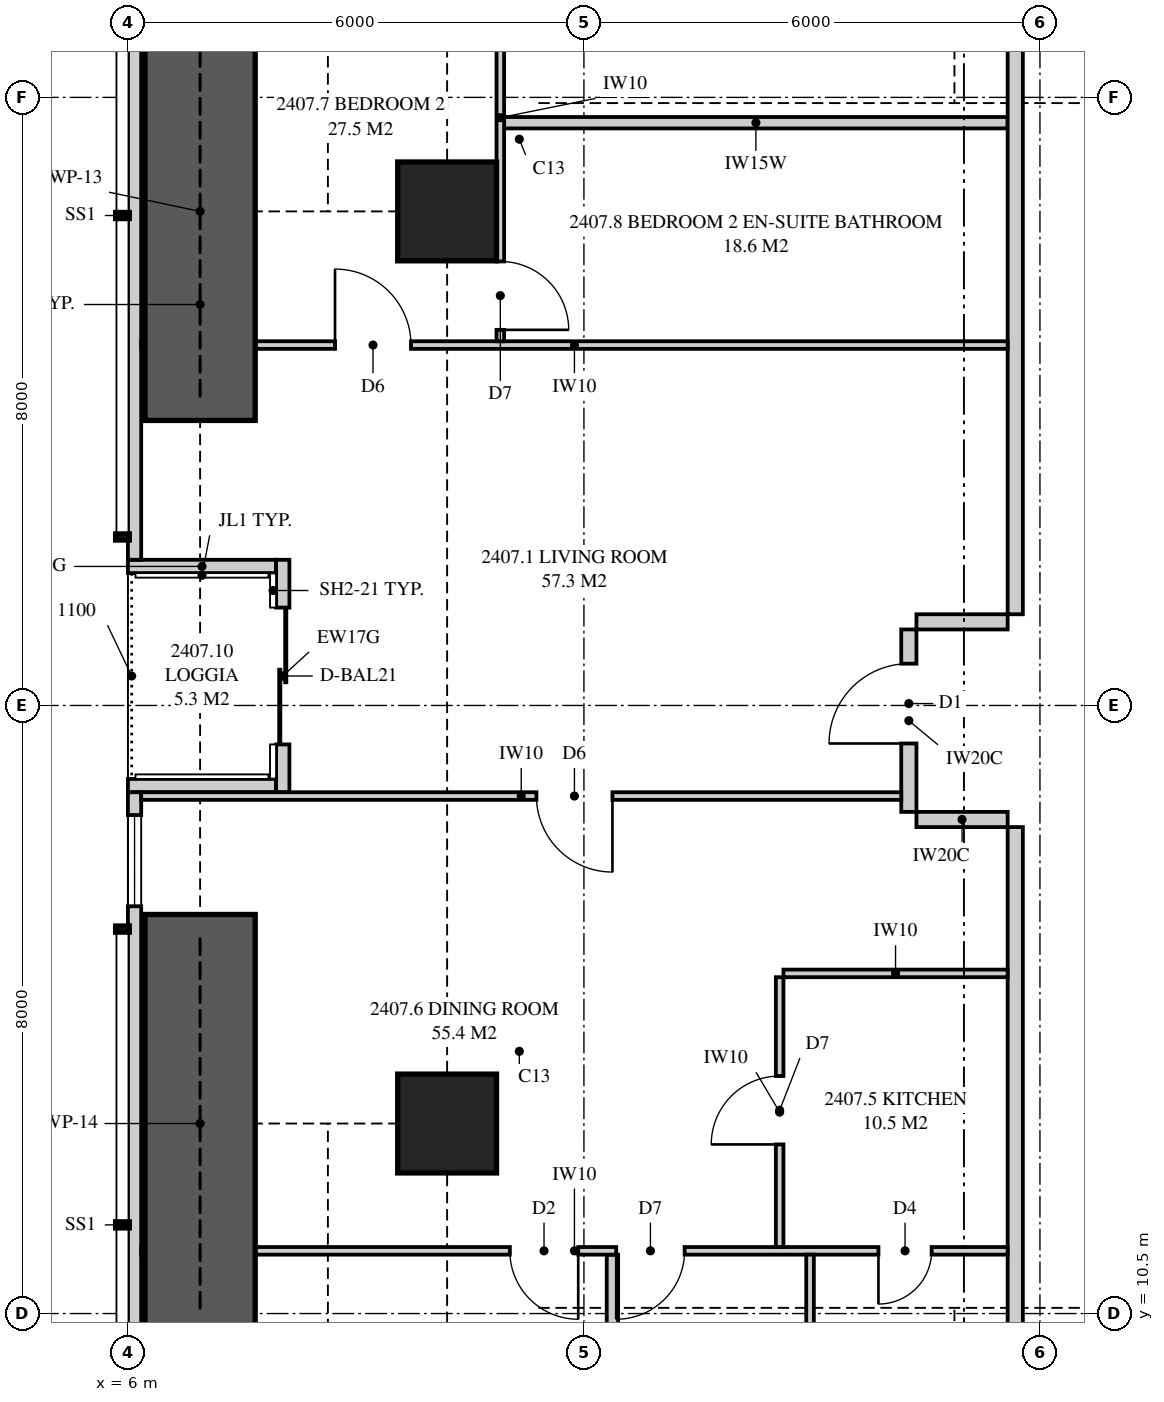
"""IFC4 building model, lengths in metres.
Left out: names, types, materials, properties, quantities, classifications, styles, units other than length and angle.
Written with IfcOpenShell. Run it as: python <this file> out.ifc"""

import sys

from ifc_helpers import new_model, si_unit, direction, frame, frame_2d, origin, origin_2d, place, context, subcontext, project, spatial, polyline, rectangle, outline, extrude, element, fill, save


model = new_model("IFC4")
c1 = context("Model", 3, precision=1e-05, world=origin(), true_north=direction((0.0, 1.0)))
c2 = subcontext(c1, "Body", "Model", "MODEL_VIEW")
j1 = project(units=[si_unit("LENGTHUNIT", "METRE"), si_unit("PLANEANGLEUNIT", "RADIAN")], contexts=[c1])
p1 = place(None, origin())
s1 = spatial("IfcSite", under=j1, at=p1, CompositionType="ELEMENT")
p2 = place(p1, origin())
s2 = spatial("IfcBuilding", under=s1, at=p2, CompositionType="ELEMENT")
p3 = place(p2, frame((0.0, 0.0, 91.45)))
s3 = spatial("IfcBuildingStorey", under=s2, at=p3, CompositionType="ELEMENT", Elevation=91.45)
for number, where, z_axis, x_axis in (
    (1, (10.2, 13.0, 0.0), (0.0, 0.0, 1.0), (1.0, 0.0, 0.0)),
    (2, (10.2, 25.0, 0.0), (0.0, 0.0, 1.0), (1.0, 0.0, 0.0)),
):
    element("IfcColumn", number, at=place(p3, frame(where, z_axis=z_axis, x_axis=x_axis)), inside=s3, PredefinedType="COLUMN", context=c2, shape_type="SweptSolid", body=[
        extrude(rectangle(XDim=1.3, YDim=1.3, at=origin_2d()), origin(), (0.0, 0.0, 1.0), 3.35),
    ])
p4 = place(p3, frame((6.087, 34.949, 0.0), z_axis=(0.0, 0.0, 1.0), x_axis=(0.0, -1.0, 0.0)))
e3 = element("IfcWall", 3, at=p4, inside=s3, PredefinedType="SOLIDWALL", context=c2, shape_type="SweptSolid", body=[
    extrude(outline(polyline([(0.0, 0.0), (14.532, 0.0), (14.532, 2.15), (9.949, 2.15), (9.949, 3.11), (9.823, 3.11), (9.823, 2.15), (9.73, 2.15), (9.73, 3.11), (0.0, 3.11), (0.0, 0.0)])), frame((0.0, 0.087, 0.0), z_axis=(0.0, -1.0, 0.0), x_axis=(1.0, 0.0, 0.0)), (0.0, 0.0, 1.0), 0.175),
])
p5 = place(p4, frame((2.724, 0.0, 0.4)))
e4 = element("IfcOpeningElement", 4, at=p5, cuts=e3, PredefinedType="OPENING", context=c2, shape_type="SweptSolid", body=[
    extrude(rectangle(XDim=1.8, YDim=1.7, at=frame_2d((0.9, 0.85))), frame((0.0, 0.097, 0.0), z_axis=(0.0, -1.0, 0.0), x_axis=(1.0, 0.0, 0.0)), (0.0, 0.0, 1.0), 0.195),
])
p6 = place(p4, frame((5.874, 0.0, 0.4)))
e5 = element("IfcOpeningElement", 5, at=p6, cuts=e3, PredefinedType="OPENING", context=c2, shape_type="SweptSolid", body=[
    extrude(rectangle(XDim=1.2, YDim=1.7, at=frame_2d((0.6, 0.85))), frame((0.0, 0.097, 0.0), z_axis=(0.0, -1.0, 0.0), x_axis=(1.0, 0.0, 0.0)), (0.0, 0.0, 1.0), 0.195),
])
p7 = place(p3, frame((6.087, 17.358, 0.0), z_axis=(0.0, 0.0, 1.0), x_axis=(0.0, -1.0, 0.0)))
e6 = element("IfcWall", 6, at=p7, inside=s3, PredefinedType="SOLIDWALL", context=c2, shape_type="SweptSolid", body=[
    extrude(outline(polyline([(0.0, 0.0), (14.307, 0.0), (14.307, 3.11), (4.577, 3.11), (4.577, 2.15), (4.484, 2.15), (4.484, 3.11), (4.358, 3.11), (4.358, 2.15), (0.0, 2.15), (0.0, 0.0)])), frame((0.0, 0.087, 0.0), z_axis=(0.0, -1.0, 0.0), x_axis=(1.0, 0.0, 0.0)), (0.0, 0.0, 1.0), 0.175),
])
p8 = place(p7, frame((0.3, 0.0, 0.4)))
e7 = element("IfcOpeningElement", 7, at=p8, cuts=e6, PredefinedType="OPENING", context=c2, shape_type="SweptSolid", body=[
    extrude(rectangle(XDim=1.2, YDim=1.7, at=frame_2d((0.6, 0.85))), frame((0.0, 0.097, 0.0), z_axis=(0.0, -1.0, 0.0), x_axis=(1.0, 0.0, 0.0)), (0.0, 0.0, 1.0), 0.195),
])
p9 = place(p7, frame((7.233, 0.0, 0.4)))
e8 = element("IfcOpeningElement", 8, at=p9, cuts=e6, PredefinedType="OPENING", context=c2, shape_type="SweptSolid", body=[
    extrude(rectangle(XDim=1.8, YDim=1.7, at=frame_2d((0.9, 0.85))), frame((0.0, 0.097, 0.0), z_axis=(0.0, -1.0, 0.0), x_axis=(1.0, 0.0, 0.0)), (0.0, 0.0, 1.0), 0.195),
])
p10 = place(p7, frame((10.283, 0.0, 0.4)))
e9 = element("IfcOpeningElement", 9, at=p10, cuts=e6, PredefinedType="OPENING", context=c2, shape_type="SweptSolid", body=[
    extrude(rectangle(XDim=1.8, YDim=1.7, at=frame_2d((0.9, 0.85))), frame((0.0, 0.097, 0.0), z_axis=(0.0, -1.0, 0.0), x_axis=(1.0, 0.0, 0.0)), (0.0, 0.0, 1.0), 0.195),
])
p11 = place(p3, frame((8.038, 20.417, 0.0), z_axis=(0.0, 0.0, 1.0), x_axis=(0.0, -1.0, 0.0)))
e10 = element("IfcWall", 10, at=p11, inside=s3, PredefinedType="SOLIDWALL", context=c2, shape_type="SweptSolid", body=[
    extrude(rectangle(XDim=3.058, YDim=0.175, at=frame_2d((1.529, 0.0))), origin(), (0.0, 0.0, 1.0), 3.11),
])
p12 = place(p11, frame((0.629, 0.0, 0.0)))
e11 = element("IfcOpeningElement", 11, at=p12, cuts=e10, PredefinedType="OPENING", context=c2, shape_type="SweptSolid", body=[
    extrude(rectangle(XDim=1.8, YDim=2.1, at=frame_2d((0.9, 1.05))), frame((0.0, 0.097, 0.0), z_axis=(0.0, -1.0, 0.0), x_axis=(1.0, 0.0, 0.0)), (0.0, 0.0, 1.0), 0.195),
])
for number, where, z_axis, x_axis in (
    (12, (6.0, 20.329, 0.0), (0.0, 0.0, 1.0), (1.0, 0.0, 0.0)),
    (13, (6.0, 17.446, 0.0), (0.0, 0.0, 1.0), (1.0, 0.0, 0.0)),
):
    element("IfcWall", number, at=place(p3, frame(where, z_axis=z_axis, x_axis=x_axis)), inside=s3, PredefinedType="SOLIDWALL", context=c2, shape_type="SweptSolid", body=[
        extrude(outline(polyline([(0.0, 0.0), (1.95, 0.0), (1.95, 3.11), (1.75, 3.11), (1.75, 2.15), (0.15, 2.15), (0.15, 3.11), (0.0, 3.11), (0.0, 0.0)])), frame((0.0, 0.087, 0.0), z_axis=(0.0, -1.0, 0.0), x_axis=(1.0, 0.0, 0.0)), (0.0, 0.0, 1.0), 0.175),
    ])
p13 = place(p3, frame((17.675, 7.825, 0.0), z_axis=(0.0, 0.0, 1.0), x_axis=(0.0, 1.0, 0.0)))
e14 = element("IfcWall", 14, at=p13, inside=s3, PredefinedType="PARTITIONING", context=c2, shape_type="SweptSolid", body=[
    extrude(outline(polyline([(0.0, 0.0), (9.075, 0.0), (9.075, 3.11), (3.087, 3.11), (3.087, 2.541), (2.413, 2.541), (2.413, 3.11), (0.0, 3.11), (0.0, 0.0)])), frame((0.0, 0.1, 0.0), z_axis=(0.0, -1.0, 0.0), x_axis=(1.0, 0.0, 0.0)), (0.0, 0.0, 1.0), 0.2),
])
p14 = place(p3, frame((6.175, 11.325, 0.0), z_axis=(0.0, 0.0, 1.0), x_axis=(1.0, 0.0, 0.0)))
e15 = element("IfcWall", 15, at=p14, inside=s3, PredefinedType="PARTITIONING", context=c2, shape_type="SweptSolid", body=[
    extrude(outline(polyline([(0.175, 3.11), (0.0, 3.11), (0.0, 0.0), (0.529, 0.0), (0.529, 0.325), (1.021, 0.325), (1.021, 0.0), (11.4, 0.0), (11.4, 3.11), (5.285, 3.11), (5.285, 2.51), (2.765, 2.51), (2.765, 3.11), (2.744, 3.11), (2.744, 2.541), (2.169, 2.541), (2.169, 3.11), (1.918, 3.11), (1.918, 2.15), (1.021, 2.15), (1.021, 1.825), (0.529, 1.825), (0.529, 2.15), (0.175, 2.15), (0.175, 3.11)])), frame((0.0, 0.05, 0.0), z_axis=(0.0, -1.0, 0.0), x_axis=(1.0, 0.0, 0.0)), (0.0, 0.0, 1.0), 0.1),
])
p15 = place(p14, frame((4.85, 0.0, 0.0)))
e16 = element("IfcOpeningElement", 16, at=p15, cuts=e15, PredefinedType="OPENING", context=c2, shape_type="SweptSolid", body=[
    extrude(rectangle(XDim=0.9, YDim=2.1, at=frame_2d((0.45, 1.05))), frame((0.0, 0.06, 0.0), z_axis=(0.0, -1.0, 0.0), x_axis=(1.0, 0.0, 0.0)), (0.0, 0.0, 1.0), 0.12),
])
p16 = place(p14, frame((6.25, 0.0, 0.0)))
e17 = element("IfcOpeningElement", 17, at=p16, cuts=e15, PredefinedType="OPENING", context=c2, shape_type="SweptSolid", body=[
    extrude(rectangle(XDim=0.9, YDim=2.1, at=frame_2d((0.45, 1.05))), frame((0.0, 0.06, 0.0), z_axis=(0.0, -1.0, 0.0), x_axis=(1.0, 0.0, 0.0)), (0.0, 0.0, 1.0), 0.12),
])
p17 = place(p14, frame((9.7, 0.0, 0.0)))
e18 = element("IfcOpeningElement", 18, at=p17, cuts=e15, PredefinedType="OPENING", context=c2, shape_type="SweptSolid", body=[
    extrude(rectangle(XDim=0.7, YDim=2.1, at=frame_2d((0.35, 1.05))), frame((0.0, 0.06, 0.0), z_axis=(0.0, -1.0, 0.0), x_axis=(1.0, 0.0, 0.0)), (0.0, 0.0, 1.0), 0.12),
])
p18 = place(p3, frame((12.375, 7.825, 0.0), z_axis=(0.0, 0.0, 1.0), x_axis=(0.0, 1.0, 0.0)))
e19 = element("IfcWall", 19, at=p18, inside=s3, PredefinedType="PLUMBINGWALL", context=c2, shape_type="SweptSolid", body=[
    extrude(outline(polyline([(0.0, 0.0), (3.45, 0.0), (3.45, 3.11), (3.062, 3.11), (3.062, 2.541), (2.438, 2.541), (2.438, 3.11), (0.0, 3.11), (0.0, 0.0)])), frame((0.0, 0.075, 0.0), z_axis=(0.0, -1.0, 0.0), x_axis=(1.0, 0.0, 0.0)), (0.0, 0.0, 1.0), 0.15),
])
p19 = place(p3, frame((14.975, 7.825, 0.0), z_axis=(0.0, 0.0, 1.0), x_axis=(0.0, 1.0, 0.0)))
e20 = element("IfcWall", 20, at=p19, inside=s3, PredefinedType="PARTITIONING", context=c2, shape_type="SweptSolid", body=[
    extrude(outline(polyline([(0.0, 0.0), (3.45, 0.0), (3.45, 3.11), (3.037, 3.11), (3.037, 2.541), (2.463, 2.541), (2.463, 3.11), (0.0, 3.11), (0.0, 0.0)])), frame((0.0, 0.05, 0.0), z_axis=(0.0, -1.0, 0.0), x_axis=(1.0, 0.0, 0.0)), (0.0, 0.0, 1.0), 0.1),
])
p20 = place(p3, frame((14.575, 11.375, 0.0), z_axis=(0.0, 0.0, 1.0), x_axis=(0.0, 1.0, 0.0)))
e21 = element("IfcWall", 21, at=p20, inside=s3, PredefinedType="PARTITIONING", context=c2, shape_type="SweptSolid", body=[
    extrude(rectangle(XDim=3.55, YDim=0.1, at=frame_2d((1.775, 0.0))), origin(), (0.0, 0.0, 1.0), 3.11),
])
p21 = place(p20, frame((1.35, 0.0, 0.0)))
e22 = element("IfcOpeningElement", 22, at=p21, cuts=e21, PredefinedType="OPENING", context=c2, shape_type="SweptSolid", body=[
    extrude(rectangle(XDim=0.9, YDim=2.1, at=frame_2d((0.45, 1.05))), frame((0.0, 0.06, 0.0), z_axis=(0.0, -1.0, 0.0), x_axis=(1.0, 0.0, 0.0)), (0.0, 0.0, 1.0), 0.12),
])
p22 = place(p3, frame((14.625, 14.975, 0.0), z_axis=(0.0, 0.0, 1.0), x_axis=(1.0, 0.0, 0.0)))
e23 = element("IfcWall", 23, at=p22, inside=s3, PredefinedType="PARTITIONING", context=c2, shape_type="SweptSolid", body=[
    extrude(rectangle(XDim=2.95, YDim=0.1, at=frame_2d((1.475, 0.0))), origin(), (0.0, 0.0, 1.0), 3.11),
])
p23 = place(p3, frame((6.175, 17.308, 0.0), z_axis=(0.0, 0.0, 1.0), x_axis=(1.0, 0.0, 0.0)))
e24 = element("IfcWall", 24, at=p23, inside=s3, PredefinedType="PARTITIONING", context=c2, shape_type="SweptSolid", body=[
    extrude(outline(polyline([(0.0, 0.0), (10.0, 0.0), (10.0, 3.11), (5.285, 3.11), (5.285, 2.51), (2.765, 2.51), (2.765, 3.11), (1.635, 3.11), (1.635, 2.15), (0.0, 2.15), (0.0, 3.11), (0.0, 0.0)])), frame((0.0, 0.05, 0.0), z_axis=(0.0, -1.0, 0.0), x_axis=(1.0, 0.0, 0.0)), (0.0, 0.0, 1.0), 0.1),
])
p24 = place(p23, frame((5.2, 0.0, 0.0)))
e25 = element("IfcOpeningElement", 25, at=p24, cuts=e24, PredefinedType="OPENING", context=c2, shape_type="SweptSolid", body=[
    extrude(rectangle(XDim=1.0, YDim=2.1, at=frame_2d((0.5, 1.05))), frame((0.0, 0.06, 0.0), z_axis=(0.0, -1.0, 0.0), x_axis=(1.0, 0.0, 0.0)), (0.0, 0.0, 1.0), 0.12),
])
p25 = place(p3, frame((6.175, 23.242, 0.0), z_axis=(0.0, 0.0, 1.0), x_axis=(1.0, 0.0, 0.0)))
e26 = element("IfcWall", 26, at=p25, inside=s3, PredefinedType="PARTITIONING", context=c2, shape_type="SweptSolid", body=[
    extrude(outline(polyline([(0.529, 2.15), (0.0, 2.15), (0.0, 0.0), (0.529, 0.0), (0.529, 0.268), (1.021, 0.268), (1.021, 0.0), (11.4, 0.0), (11.4, 3.11), (5.285, 3.11), (5.285, 2.51), (2.765, 2.51), (2.765, 3.11), (1.635, 3.11), (1.635, 2.15), (1.021, 2.15), (1.021, 1.882), (0.529, 1.882), (0.529, 2.15)])), frame((0.0, 0.05, 0.0), z_axis=(0.0, -1.0, 0.0), x_axis=(1.0, 0.0, 0.0)), (0.0, 0.0, 1.0), 0.1),
])
p26 = place(p25, frame((2.55, 0.0, 0.0)))
e27 = element("IfcOpeningElement", 27, at=p26, cuts=e26, PredefinedType="OPENING", context=c2, shape_type="SweptSolid", body=[
    extrude(rectangle(XDim=1.0, YDim=2.1, at=frame_2d((0.5, 1.05))), frame((0.0, 0.06, 0.0), z_axis=(0.0, -1.0, 0.0), x_axis=(1.0, 0.0, 0.0)), (0.0, 0.0, 1.0), 0.12),
])
p27 = place(p3, frame((17.675, 19.7, 0.0), z_axis=(0.0, 0.0, 1.0), x_axis=(0.0, 1.0, 0.0)))
e28 = element("IfcWall", 28, at=p27, inside=s3, PredefinedType="PARTITIONING", context=c2, shape_type="SweptSolid", body=[
    extrude(outline(polyline([(0.0, 0.0), (9.475, 0.0), (9.475, 3.11), (7.062, 3.11), (7.062, 2.541), (6.388, 2.541), (6.388, 3.11), (0.0, 3.11), (0.0, 0.0)])), frame((0.0, 0.1, 0.0), z_axis=(0.0, -1.0, 0.0), x_axis=(1.0, 0.0, 0.0)), (0.0, 0.0, 1.0), 0.2),
])
p28 = place(p3, frame((16.275, 17.1, 0.0), z_axis=(0.0, 0.0, 1.0), x_axis=(0.0, 1.0, 0.0)))
e29 = element("IfcWall", 29, at=p28, inside=s3, PredefinedType="PARTITIONING", context=c2, shape_type="SweptSolid", body=[
    extrude(rectangle(XDim=2.4, YDim=0.2, at=frame_2d((1.2, 0.0))), origin(), (0.0, 0.0, 1.0), 3.11),
])
p29 = place(p28, frame((0.9, 0.0, 0.0)))
e30 = element("IfcOpeningElement", 30, at=p29, cuts=e29, PredefinedType="OPENING", context=c2, shape_type="SweptSolid", body=[
    extrude(rectangle(XDim=1.05, YDim=2.2, at=frame_2d((0.525, 1.1))), frame((0.0, 0.11, 0.0), z_axis=(0.0, -1.0, 0.0), x_axis=(1.0, 0.0, 0.0)), (0.0, 0.0, 1.0), 0.22),
])
for number, where, z_axis, x_axis in (
    (31, (17.575, 17.0, 0.0), (0.0, 0.0, 1.0), (-1.0, 0.0, 0.0)),
    (32, (17.575, 19.6, 0.0), (0.0, 0.0, 1.0), (-1.0, 0.0, 0.0)),
):
    element("IfcWall", number, at=place(p3, frame(where, z_axis=z_axis, x_axis=x_axis)), inside=s3, PredefinedType="PARTITIONING", context=c2, shape_type="SweptSolid", body=[
        extrude(rectangle(XDim=1.2, YDim=0.2, at=frame_2d((0.6, 0.0))), origin(), (0.0, 0.0, 1.0), 3.11),
    ])
p30 = place(p3, frame((10.9, 23.292, 0.0), z_axis=(0.0, 0.0, 1.0), x_axis=(0.0, 1.0, 0.0)))
e33 = element("IfcWall", 33, at=p30, inside=s3, PredefinedType="PARTITIONING", context=c2, shape_type="SweptSolid", body=[
    extrude(outline(polyline([(0.0, 0.0), (5.883, 0.0), (5.883, 3.11), (5.883, 2.51), (1.768, 2.51), (0.0, 2.51), (0.0, 3.11), (0.0, 0.0)])), frame((0.0, 0.05, 0.0), z_axis=(0.0, -1.0, 0.0), x_axis=(1.0, 0.0, 0.0)), (0.0, 0.0, 1.0), 0.1),
])
p31 = place(p30, frame((0.15, 0.0, 0.0)))
e34 = element("IfcOpeningElement", 34, at=p31, cuts=e33, PredefinedType="OPENING", context=c2, shape_type="SweptSolid", body=[
    extrude(rectangle(XDim=0.9, YDim=2.1, at=frame_2d((0.45, 1.05))), frame((0.0, 0.06, 0.0), z_axis=(0.0, -1.0, 0.0), x_axis=(1.0, 0.0, 0.0)), (0.0, 0.0, 1.0), 0.12),
])
p32 = place(p30, frame((4.017, 0.0, 0.0)))
e35 = element("IfcOpeningElement", 35, at=p32, cuts=e33, PredefinedType="OPENING", context=c2, shape_type="SweptSolid", body=[
    extrude(rectangle(XDim=0.9, YDim=2.1, at=frame_2d((0.45, 1.05))), frame((0.0, 0.06, 0.0), z_axis=(0.0, -1.0, 0.0), x_axis=(1.0, 0.0, 0.0)), (0.0, 0.0, 1.0), 0.12),
])
p33 = place(p3, frame((10.95, 26.167, 0.0), z_axis=(0.0, 0.0, 1.0), x_axis=(1.0, 0.0, 0.0)))
e36 = element("IfcWall", 36, at=p33, inside=s3, PredefinedType="PLUMBINGWALL", context=c2, shape_type="SweptSolid", body=[
    extrude(outline(polyline([(0.0, 0.0), (6.625, 0.0), (6.625, 3.11), (6.625, 2.541), (0.535, 2.541), (0.535, 2.51), (0.0, 2.51), (0.0, 3.11), (0.0, 0.0)])), frame((0.0, 0.075, 0.0), z_axis=(0.0, -1.0, 0.0), x_axis=(1.0, 0.0, 0.0)), (0.0, 0.0, 1.0), 0.15),
])
for number, where, z_axis, x_axis in (
    (37, (6.95, 22.25, 0.0), (0.0, 0.0, 1.0), (0.0, 1.0, 0.0)),
    (38, (6.95, 10.25, 0.0), (0.0, 0.0, 1.0), (0.0, 1.0, 0.0)),
):
    element("IfcWall", number, at=place(p3, frame(where, z_axis=z_axis, x_axis=x_axis)), inside=s3, PredefinedType="SHEAR", context=c2, shape_type="SweptSolid", body=[
        extrude(rectangle(XDim=5.5, YDim=1.45, at=frame_2d((2.75, 0.0))), origin(), (0.0, 0.0, 1.0), 3.35),
    ])
p34 = place(p12, origin())
e39 = element("IfcDoor", 39, at=p34, inside=s3, OperationType="SLIDING_TO_LEFT", PredefinedType="DOOR", context=c2, shape_type="SweptSolid", body=[
    extrude(rectangle(XDim=1.8, YDim=2.1, at=frame_2d((0.9, 1.05))), frame((0.0, 0.025, 0.0), z_axis=(0.0, -1.0, 0.0), x_axis=(1.0, 0.0, 0.0)), (0.0, 0.0, 1.0), 0.05),
])
fill(e11, e39)
p35 = place(p8, origin())
e40 = element("IfcWindow", 40, at=p35, inside=s3, PartitioningType="SINGLE_PANEL", PredefinedType="WINDOW", context=c2, shape_type="SweptSolid", body=[
    extrude(rectangle(XDim=1.2, YDim=1.7, at=frame_2d((0.6, 0.85))), frame((0.0, 0.03, 0.0), z_axis=(0.0, -1.0, 0.0), x_axis=(1.0, 0.0, 0.0)), (0.0, 0.0, 1.0), 0.06),
])
fill(e7, e40)
p36 = place(p29, origin())
e41 = element("IfcDoor", 41, at=p36, inside=s3, OperationType="SINGLE_SWING_LEFT", PredefinedType="DOOR", context=c2, shape_type="SweptSolid", body=[
    extrude(rectangle(XDim=1.05, YDim=2.2, at=frame_2d((0.525, 1.1))), frame((0.0, 0.025, 0.0), z_axis=(0.0, -1.0, 0.0), x_axis=(1.0, 0.0, 0.0)), (0.0, 0.0, 1.0), 0.05),
])
fill(e30, e41)
p37 = place(p15, frame((0.9, 0.0, 0.0), z_axis=(0.0, 0.0, 1.0), x_axis=(-1.0, 0.0, 0.0)))
e42 = element("IfcDoor", 42, at=p37, inside=s3, OperationType="SINGLE_SWING_LEFT", PredefinedType="DOOR", context=c2, shape_type="SweptSolid", body=[
    extrude(rectangle(XDim=0.9, YDim=2.1, at=frame_2d((0.45, 1.05))), frame((0.0, 0.025, 0.0), z_axis=(0.0, -1.0, 0.0), x_axis=(1.0, 0.0, 0.0)), (0.0, 0.0, 1.0), 0.05),
])
fill(e16, e42)
p38 = place(p16, frame((0.9, 0.0, 0.0), z_axis=(0.0, 0.0, 1.0), x_axis=(-1.0, 0.0, 0.0)))
e43 = element("IfcDoor", 43, at=p38, inside=s3, OperationType="SINGLE_SWING_RIGHT", PredefinedType="DOOR", context=c2, shape_type="SweptSolid", body=[
    extrude(rectangle(XDim=0.9, YDim=2.1, at=frame_2d((0.45, 1.05))), frame((0.0, 0.025, 0.0), z_axis=(0.0, -1.0, 0.0), x_axis=(1.0, 0.0, 0.0)), (0.0, 0.0, 1.0), 0.05),
])
fill(e17, e43)
p39 = place(p17, frame((0.7, 0.0, 0.0), z_axis=(0.0, 0.0, 1.0), x_axis=(-1.0, 0.0, 0.0)))
e44 = element("IfcDoor", 44, at=p39, inside=s3, OperationType="SINGLE_SWING_RIGHT", PredefinedType="DOOR", context=c2, shape_type="SweptSolid", body=[
    extrude(rectangle(XDim=0.7, YDim=2.1, at=frame_2d((0.35, 1.05))), frame((0.0, 0.025, 0.0), z_axis=(0.0, -1.0, 0.0), x_axis=(1.0, 0.0, 0.0)), (0.0, 0.0, 1.0), 0.05),
])
fill(e18, e44)
p40 = place(p21, origin())
e45 = element("IfcDoor", 45, at=p40, inside=s3, OperationType="SINGLE_SWING_LEFT", PredefinedType="DOOR", context=c2, shape_type="SweptSolid", body=[
    extrude(rectangle(XDim=0.9, YDim=2.1, at=frame_2d((0.45, 1.05))), frame((0.0, 0.025, 0.0), z_axis=(0.0, -1.0, 0.0), x_axis=(1.0, 0.0, 0.0)), (0.0, 0.0, 1.0), 0.05),
])
fill(e22, e45)
p41 = place(p24, frame((1.0, 0.0, 0.0), z_axis=(0.0, 0.0, 1.0), x_axis=(-1.0, 0.0, 0.0)))
e46 = element("IfcDoor", 46, at=p41, inside=s3, OperationType="SINGLE_SWING_LEFT", PredefinedType="DOOR", context=c2, shape_type="SweptSolid", body=[
    extrude(rectangle(XDim=1.0, YDim=2.1, at=frame_2d((0.5, 1.05))), frame((0.0, 0.025, 0.0), z_axis=(0.0, -1.0, 0.0), x_axis=(1.0, 0.0, 0.0)), (0.0, 0.0, 1.0), 0.05),
])
fill(e25, e46)
p42 = place(p26, origin())
e47 = element("IfcDoor", 47, at=p42, inside=s3, OperationType="SINGLE_SWING_LEFT", PredefinedType="DOOR", context=c2, shape_type="SweptSolid", body=[
    extrude(rectangle(XDim=1.0, YDim=2.1, at=frame_2d((0.5, 1.05))), frame((0.0, 0.025, 0.0), z_axis=(0.0, -1.0, 0.0), x_axis=(1.0, 0.0, 0.0)), (0.0, 0.0, 1.0), 0.05),
])
fill(e27, e47)
p43 = place(p31, frame((0.9, 0.0, 0.0), z_axis=(0.0, 0.0, 1.0), x_axis=(-1.0, 0.0, 0.0)))
e48 = element("IfcDoor", 48, at=p43, inside=s3, OperationType="SINGLE_SWING_RIGHT", PredefinedType="DOOR", context=c2, shape_type="SweptSolid", body=[
    extrude(rectangle(XDim=0.9, YDim=2.1, at=frame_2d((0.45, 1.05))), frame((0.0, 0.025, 0.0), z_axis=(0.0, -1.0, 0.0), x_axis=(1.0, 0.0, 0.0)), (0.0, 0.0, 1.0), 0.05),
])
fill(e34, e48)
save(model, sys.argv[1])
